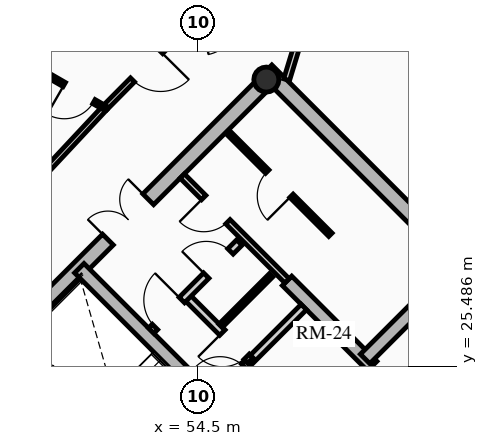
"""IFC4 building model, lengths in metres.
Left out: names, types, materials, properties, quantities, classifications, styles, units other than length and angle.
Written with IfcOpenShell. Run it as: python <this file> out.ifc"""

import sys

from ifc_helpers import new_model, si_unit, direction, frame, frame_2d, origin, origin_2d, place, context, subcontext, project, spatial, rectangle, hollow_circle, extrude, source, transform, mapped, element, fill, save


model = new_model("IFC4")
c1 = context("Model", 3, precision=1e-05, world=origin(), true_north=direction((0.0, 1.0)))
c2 = subcontext(c1, "Body", "Model", "MODEL_VIEW")
j1 = project(units=[si_unit("LENGTHUNIT", "METRE"), si_unit("PLANEANGLEUNIT", "RADIAN")], contexts=[c1])
p1 = place(None, origin())
s1 = spatial("IfcSite", under=j1, at=p1, CompositionType="ELEMENT")
p2 = place(p1, origin())
s2 = spatial("IfcBuilding", under=s1, at=p2, CompositionType="ELEMENT")
p3 = place(p2, frame((0.0, 0.0, 211.21)))
s3 = spatial("IfcBuildingStorey", under=s2, at=p3, CompositionType="ELEMENT", Elevation=211.21)
for number, where, z_axis, x_axis in (
    (1, (58.702, 15.732, 0.0), (0.0, 0.0, 1.0), (-0.707, 0.707, 0.0)),
    (2, (66.268, 23.298, 0.0), (0.0, 0.0, 1.0), (-0.707, 0.707, 0.0)),
):
    element("IfcWall", number, at=place(p3, frame(where, z_axis=z_axis, x_axis=x_axis)), inside=s3, PredefinedType="SHEAR", context=c2, shape_type="SweptSolid", body=[
        extrude(rectangle(XDim=14.1, YDim=0.4, at=frame_2d((7.05, 0.0))), origin(), (0.0, 0.0, 1.0), 2.91),
    ])
p4 = place(p3, frame((48.873, 25.561, 0.0), z_axis=(0.0, 0.0, 1.0), x_axis=(0.707106781187, 0.707106781187, 0.0)))
e3 = element("IfcWall", 3, at=p4, inside=s3, PredefinedType="SHEAR", context=c2, shape_type="SweptSolid", body=[
    extrude(rectangle(XDim=10.7, YDim=0.4, at=frame_2d((5.35, 0.0))), origin(), (0.0, 0.0, 1.0), 2.91),
])
m1 = source(origin(), c2, "Body", "SweptSolid", [
    extrude(rectangle(XDim=1.5, YDim=2.02, at=frame_2d((0.75, 1.01))), frame((0.0, 0.21, 0.0), z_axis=(0.0, -1.0, 0.0), x_axis=(1.0, 0.0, 0.0)), (0.0, 0.0, 1.0), 0.42),
])
p5 = place(p4, frame((4.6, 0.0, 0.0)))
e4 = element("IfcOpeningElement", 4, at=p5, cuts=e3, PredefinedType="OPENING", context=c2, shape_type="MappedRepresentation", body=[
    mapped(m1, transform((0.0, 0.0, 0.0), x_axis=(1.0, 0.0, 0.0), y_axis=(0.0, 1.0, 0.0), z_axis=(0.0, 0.0, 1.0), scale=1.0)),
])
p6 = place(p3, frame((61.06, 18.373, 0.0), z_axis=(0.0, 0.0, 1.0), x_axis=(-0.707106781187, 0.707106781187, 0.0)))
e5 = element("IfcWall", 5, at=p6, inside=s3, PredefinedType="SHEAR", context=c2, shape_type="SweptSolid", body=[
    extrude(rectangle(XDim=13.7, YDim=0.35, at=frame_2d((6.85, 0.0))), origin(), (0.0, 0.0, 1.0), 2.91),
])
m2 = source(origin(), c2, "Body", "SweptSolid", [
    extrude(rectangle(XDim=1.1, YDim=2.015, at=frame_2d((0.55, 1.007))), frame((0.0, 0.185, 0.0), z_axis=(0.0, -1.0, 0.0), x_axis=(1.0, 0.0, 0.0)), (0.0, 0.0, 1.0), 0.37),
])
p7 = place(p6, frame((4.85, 0.0, 0.0)))
e6 = element("IfcOpeningElement", 6, at=p7, cuts=e5, PredefinedType="OPENING", context=c2, shape_type="MappedRepresentation", body=[
    mapped(m2, transform((0.0, 0.0, 0.0), x_axis=(1.0, 0.0, 0.0), y_axis=(0.0, 1.0, 0.0), z_axis=(0.0, 0.0, 1.0), scale=1.0)),
])
p8 = place(p6, frame((0.625, 0.0, 0.0)))
e7 = element("IfcOpeningElement", 7, at=p8, cuts=e5, PredefinedType="OPENING", context=c2, shape_type="MappedRepresentation", body=[
    mapped(m2, transform((0.0, 0.0, 0.0), x_axis=(1.0, 0.0, 0.0), y_axis=(0.0, 1.0, 0.0), z_axis=(0.0, 0.0, 1.0), scale=1.0)),
])
p9 = place(p6, frame((2.625, 0.0, 0.0)))
e8 = element("IfcOpeningElement", 8, at=p9, cuts=e5, PredefinedType="OPENING", context=c2, shape_type="MappedRepresentation", body=[
    mapped(m2, transform((0.0, 0.0, 0.0), x_axis=(1.0, 0.0, 0.0), y_axis=(0.0, 1.0, 0.0), z_axis=(0.0, 0.0, 1.0), scale=1.0)),
])
m3 = source(origin(), c2, "Body", "SweptSolid", [
    extrude(rectangle(XDim=1.15, YDim=2.02, at=frame_2d((0.575, 1.01))), frame((0.0, 0.185, 0.0), z_axis=(0.0, -1.0, 0.0), x_axis=(1.0, 0.0, 0.0)), (0.0, 0.0, 1.0), 0.37),
])
p10 = place(p6, frame((7.27, 0.0, 0.0)))
e9 = element("IfcOpeningElement", 9, at=p10, cuts=e5, PredefinedType="OPENING", context=c2, shape_type="MappedRepresentation", body=[
    mapped(m3, transform((0.0, 0.0, 0.0), x_axis=(1.0, 0.0, 0.0), y_axis=(0.0, 1.0, 0.0), z_axis=(0.0, 0.0, 1.0), scale=1.0)),
])
p11 = place(p3, frame((63.627, 20.94, 0.0), z_axis=(0.0, 0.0, 1.0), x_axis=(-0.707119496762, 0.707094065383, 0.0)))
e10 = element("IfcWall", 10, at=p11, inside=s3, PredefinedType="SHEAR", context=c2, shape_type="SweptSolid", body=[
    extrude(rectangle(XDim=9.6, YDim=0.35, at=frame_2d((4.8, 0.0))), origin(), (0.0, 0.0, 1.0), 2.91),
])
p12 = place(p11, frame((5.28, 0.0, 0.0)))
e11 = element("IfcOpeningElement", 11, at=p12, cuts=e10, PredefinedType="OPENING", context=c2, shape_type="MappedRepresentation", body=[
    mapped(m3, transform((0.0, 0.0, 0.0), x_axis=(1.0, 0.0, 0.0), y_axis=(0.0, 1.0, 0.0), z_axis=(0.0, 0.0, 1.0), scale=1.0)),
])
p13 = place(p3, frame((53.922, 21.141, 0.0), z_axis=(0.0, 0.0, 1.0), x_axis=(-0.707106781187, 0.707106781187, 0.0)))
e12 = element("IfcWall", 12, at=p13, inside=s3, PredefinedType="SHEAR", context=c2, shape_type="SweptSolid", body=[
    extrude(rectangle(XDim=6.695, YDim=0.35, at=frame_2d((3.348, 0.0))), origin(), (0.0, 0.0, 1.0), 2.91),
])
p14 = place(p3, frame((58.893, 25.674, 0.0), z_axis=(0.0, 0.0, 1.0), x_axis=(0.707106781187, 0.707106781187, 0.0)))
e13 = element("IfcWall", 13, at=p14, inside=s3, PredefinedType="SHEAR", context=c2, shape_type="SweptSolid", body=[
    extrude(rectangle(XDim=3.285, YDim=0.35, at=frame_2d((1.643, 0.0))), origin(), (0.0, 0.0, 1.0), 2.91),
])
p15 = place(p3, frame((56.294, 33.024, 0.0), z_axis=(0.0, 0.0, 1.0), x_axis=(0.707106781187, 0.707106781187, 0.0)))
e14 = element("IfcColumn", 14, at=p15, inside=s3, PredefinedType="COLUMN", context=c2, shape_type="SweptSolid", body=[
    extrude(hollow_circle(Radius=0.33, WallThickness=0.025, at=origin_2d()), origin(), (0.0, 0.0, 1.0), 2.91),
])
p16 = place(p3, frame((54.961, 24.719, 0.0), z_axis=(0.0, 0.0, 1.0), x_axis=(0.707106781187, 0.707106781187, 0.0)))
e15 = element("IfcWall", 15, at=p16, inside=s3, PredefinedType="PARTITIONING", context=c2, shape_type="SweptSolid", body=[
    extrude(rectangle(XDim=3.28, YDim=0.2, at=frame_2d((1.64, 0.0))), origin(), (0.0, 0.0, 1.0), 2.685),
])
m4 = source(origin(), c2, "Body", "SweptSolid", [
    extrude(rectangle(XDim=0.9, YDim=2.005, at=frame_2d((0.45, 1.002))), frame((0.0, 0.11, 0.0), z_axis=(0.0, -1.0, 0.0), x_axis=(1.0, 0.0, 0.0)), (0.0, 0.0, 1.0), 0.22),
])
p17 = place(p16, frame((0.16, 0.0, 0.0)))
e16 = element("IfcOpeningElement", 16, at=p17, cuts=e15, PredefinedType="OPENING", context=c2, shape_type="MappedRepresentation", body=[
    mapped(m4, transform((0.0, 0.0, 0.0), x_axis=(1.0, 0.0, 0.0), y_axis=(0.0, 1.0, 0.0), z_axis=(0.0, 0.0, 1.0), scale=1.0)),
])
p18 = place(p3, frame((55.874, 25.631, 0.0), z_axis=(0.0, 0.0, 1.0), x_axis=(-0.707157639372, 0.707055919343, 0.0)))
e17 = element("IfcWall", 17, at=p18, inside=s3, PredefinedType="PARTITIONING", context=c2, shape_type="SweptSolid", body=[
    extrude(rectangle(XDim=2.4, YDim=0.2, at=frame_2d((1.2, 0.0))), origin(), (0.0, 0.0, 1.0), 2.685),
])
p19 = place(p18, frame((0.14, 0.0, 0.0)))
e18 = element("IfcOpeningElement", 18, at=p19, cuts=e17, PredefinedType="OPENING", context=c2, shape_type="MappedRepresentation", body=[
    mapped(m4, transform((0.0, 0.0, 0.0), x_axis=(1.0, 0.0, 0.0), y_axis=(0.0, 1.0, 0.0), z_axis=(0.0, 0.0, 1.0), scale=1.0)),
])
p20 = place(p3, frame((53.264, 26.416, 0.0), z_axis=(0.0, 0.0, 1.0), x_axis=(0.707106781187, 0.707106781187, 0.0)))
e19 = element("IfcWall", 19, at=p20, inside=s3, PredefinedType="PARTITIONING", context=c2, shape_type="SweptSolid", body=[
    extrude(rectangle(XDim=3.28, YDim=0.2, at=frame_2d((1.64, 0.0))), origin(), (0.0, 0.0, 1.0), 2.685),
])
m5 = source(origin(), c2, "Body", "SweptSolid", [
    extrude(rectangle(XDim=1.0, YDim=2.015, at=frame_2d((0.5, 1.007))), frame((0.0, 0.11, 0.0), z_axis=(0.0, -1.0, 0.0), x_axis=(1.0, 0.0, 0.0)), (0.0, 0.0, 1.0), 0.22),
])
p21 = place(p20, frame((0.14, 0.0, 0.0)))
e20 = element("IfcOpeningElement", 20, at=p21, cuts=e19, PredefinedType="OPENING", context=c2, shape_type="MappedRepresentation", body=[
    mapped(m5, transform((0.0, 0.0, 0.0), x_axis=(1.0, 0.0, 0.0), y_axis=(0.0, 1.0, 0.0), z_axis=(0.0, 0.0, 1.0), scale=1.0)),
])
p22 = place(p20, frame((2.05, 0.0, 0.0)))
e21 = element("IfcOpeningElement", 21, at=p22, cuts=e19, PredefinedType="OPENING", context=c2, shape_type="MappedRepresentation", body=[
    mapped(m4, transform((0.0, 0.0, 0.0), x_axis=(1.0, 0.0, 0.0), y_axis=(0.0, 1.0, 0.0), z_axis=(0.0, 0.0, 1.0), scale=1.0)),
])
p23 = place(p3, frame((55.089, 26.543, 0.0), z_axis=(0.0, 0.0, 1.0), x_axis=(0.707106781187, 0.707106781187, 0.0)))
e22 = element("IfcWall", 22, at=p23, inside=s3, PredefinedType="PARTITIONING", context=c2, shape_type="SweptSolid", body=[
    extrude(rectangle(XDim=1.88, YDim=0.125, at=frame_2d((0.94, 0.0))), origin(), (0.0, 0.0, 1.0), 2.685),
])
p24 = place(p3, frame((56.839, 27.728, 0.0), z_axis=(0.0, 0.0, 1.0), x_axis=(-0.707106781187, 0.707106781187, 0.0)))
e23 = element("IfcWall", 23, at=p24, inside=s3, PredefinedType="PARTITIONING", context=c2, shape_type="SweptSolid", body=[
    extrude(rectangle(XDim=3.9, YDim=0.16, at=frame_2d((1.95, 0.0))), origin(), (0.0, 0.0, 1.0), 2.685),
])
m6 = source(origin(), c2, "Body", "SweptSolid", [
    extrude(rectangle(XDim=0.9, YDim=2.005, at=frame_2d((0.45, 1.002))), frame((0.0, 0.09, 0.0), z_axis=(0.0, -1.0, 0.0), x_axis=(1.0, 0.0, 0.0)), (0.0, 0.0, 1.0), 0.18),
])
p25 = place(p24, frame((2.2, 0.0, 0.0)))
e24 = element("IfcOpeningElement", 24, at=p25, cuts=e23, PredefinedType="OPENING", context=c2, shape_type="MappedRepresentation", body=[
    mapped(m6, transform((0.0, 0.0, 0.0), x_axis=(1.0, 0.0, 0.0), y_axis=(0.0, 1.0, 0.0), z_axis=(0.0, 0.0, 1.0), scale=1.0)),
])
p26 = place(p3, frame((57.981, 28.941, 0.0), z_axis=(0.0, 0.0, 1.0), x_axis=(-0.707074823725, 0.707138737204, 0.0)))
e25 = element("IfcWall", 25, at=p26, inside=s3, PredefinedType="PARTITIONING", context=c2, shape_type="SweptSolid", body=[
    extrude(rectangle(XDim=3.82, YDim=0.125, at=frame_2d((1.91, 0.0))), origin(), (0.0, 0.0, 1.0), 2.685),
])
m7 = source(origin(), c2, "Body", "SweptSolid", [
    extrude(rectangle(XDim=0.9, YDim=2.005, at=frame_2d((0.45, 1.002))), frame((0.0, 0.073, 0.0), z_axis=(0.0, -1.0, 0.0), x_axis=(1.0, 0.0, 0.0)), (0.0, 0.0, 1.0), 0.145),
])
p27 = place(p26, frame((1.45, 0.0, 0.0)))
e26 = element("IfcOpeningElement", 26, at=p27, cuts=e25, PredefinedType="OPENING", context=c2, shape_type="MappedRepresentation", body=[
    mapped(m7, transform((0.0, 0.0, 0.0), x_axis=(1.0, 0.0, 0.0), y_axis=(0.0, 1.0, 0.0), z_axis=(0.0, 0.0, 1.0), scale=1.0)),
])
p28 = place(p3, frame((54.427, 34.683, 0.0), z_axis=(0.0, 0.0, 1.0), x_axis=(-0.704178989986, -0.710022499687, 0.0)))
e27 = element("IfcWall", 27, at=p28, inside=s3, PredefinedType="PARTITIONING", context=c2, shape_type="SweptSolid", body=[
    extrude(rectangle(XDim=3.384, YDim=0.15, at=frame_2d((1.692, 0.0))), origin(), (0.0, 0.0, 1.0), 2.322),
])
m8 = source(origin(), c2, "Body", "SweptSolid", [
    extrude(rectangle(XDim=1.05, YDim=2.015, at=frame_2d((0.525, 1.007))), frame((0.0, 0.085, 0.0), z_axis=(0.0, -1.0, 0.0), x_axis=(1.0, 0.0, 0.0)), (0.0, 0.0, 1.0), 0.17),
])
p29 = place(p28, frame((1.298, 0.0, 0.0)))
e28 = element("IfcOpeningElement", 28, at=p29, cuts=e27, PredefinedType="OPENING", context=c2, shape_type="MappedRepresentation", body=[
    mapped(m8, transform((0.0, 0.0, 0.0), x_axis=(1.0, 0.0, 0.0), y_axis=(0.0, 1.0, 0.0), z_axis=(0.0, 0.0, 1.0), scale=1.0)),
])
p30 = place(p3, frame((52.043, 32.28, 0.0), z_axis=(0.0, 0.0, 1.0), x_axis=(-0.682606081633, -0.730786519661, 0.0)))
e29 = element("IfcWall", 29, at=p30, inside=s3, PredefinedType="PARTITIONING", context=c2, shape_type="SweptSolid", body=[
    extrude(rectangle(XDim=6.527, YDim=0.15, at=frame_2d((3.263, 0.0))), origin(), (0.0, 0.0, 1.0), 2.255),
])
p31 = place(p3, frame((56.828, 33.021, 0.0), z_axis=(0.0, 0.0, 1.0), x_axis=(0.292139093972, 0.956375841274, 0.0)))
e30 = element("IfcWall", 30, at=p31, inside=s3, PredefinedType="PARTITIONING", context=c2, shape_type="SweptSolid", body=[
    extrude(rectangle(XDim=2.186, YDim=0.16, at=frame_2d((1.093, 0.0))), origin(), (0.0, 0.0, 1.0), 2.255),
])
m9 = source(origin(), c2, "Body", "SweptSolid", [
    extrude(rectangle(XDim=1.05, YDim=2.015, at=frame_2d((0.525, 1.007))), frame((0.0, 0.09, 0.0), z_axis=(0.0, -1.0, 0.0), x_axis=(1.0, 0.0, 0.0)), (0.0, 0.0, 1.0), 0.18),
])
p32 = place(p31, frame((0.936, 0.0, 0.0)))
e31 = element("IfcOpeningElement", 31, at=p32, cuts=e30, PredefinedType="OPENING", context=c2, shape_type="MappedRepresentation", body=[
    mapped(m9, transform((0.0, 0.0, 0.0), x_axis=(1.0, 0.0, 0.0), y_axis=(0.0, 1.0, 0.0), z_axis=(0.0, 0.0, 1.0), scale=1.0)),
])
p33 = place(p3, frame((52.043, 32.28, 0.0), z_axis=(0.0, 0.0, 1.0), x_axis=(-0.866853616581, 0.498562741709, 0.0)))
e32 = element("IfcWall", 32, at=p33, inside=s3, PredefinedType="PARTITIONING", context=c2, shape_type="SweptSolid", body=[
    extrude(rectangle(XDim=6.308, YDim=0.125, at=frame_2d((3.154, 0.0))), origin(), (0.0, 0.0, 1.0), 2.322),
])
p34 = place(p33, frame((0.33, 0.0, 0.0)))
e33 = element("IfcOpeningElement", 33, at=p34, cuts=e32, PredefinedType="OPENING", context=c2, shape_type="MappedRepresentation", body=[
    mapped(m7, transform((0.0, 0.0, 0.0), x_axis=(1.0, 0.0, 0.0), y_axis=(0.0, 1.0, 0.0), z_axis=(0.0, 0.0, 1.0), scale=1.0)),
])
m10 = source(origin(), c2, "Body", "SweptSolid", [
    extrude(rectangle(XDim=1.15, YDim=2.02, at=frame_2d((0.575, 1.01))), frame((0.0, 0.025, 0.0), z_axis=(0.0, -1.0, 0.0), x_axis=(1.0, 0.0, 0.0)), (0.0, 0.0, 1.0), 0.05),
])
p35 = place(p12, origin())
e34 = element("IfcDoor", 34, at=p35, inside=s3, OperationType="SINGLE_SWING_RIGHT", PredefinedType="DOOR", context=c2, shape_type="MappedRepresentation", body=[
    mapped(m10, transform((0.0, 0.0, 0.0), x_axis=(1.0, 0.0, 0.0), y_axis=(0.0, 1.0, 0.0), z_axis=(0.0, 0.0, 1.0), scale=1.0)),
])
fill(e11, e34)
m11 = source(origin(), c2, "Body", "SweptSolid", [
    extrude(rectangle(XDim=1.5, YDim=2.02, at=frame_2d((0.75, 1.01))), frame((0.0, 0.025, 0.0), z_axis=(0.0, -1.0, 0.0), x_axis=(1.0, 0.0, 0.0)), (0.0, 0.0, 1.0), 0.05),
])
p36 = place(p5, origin())
e35 = element("IfcDoor", 35, at=p36, inside=s3, OperationType="DOUBLE_DOOR_SINGLE_SWING", PredefinedType="DOOR", context=c2, shape_type="MappedRepresentation", body=[
    mapped(m11, transform((0.0, 0.0, 0.0), x_axis=(1.0, 0.0, 0.0), y_axis=(0.0, 1.0, 0.0), z_axis=(0.0, 0.0, 1.0), scale=1.0)),
])
fill(e4, e35)
m12 = source(origin(), c2, "Body", "SweptSolid", [
    extrude(rectangle(XDim=0.9, YDim=2.005, at=frame_2d((0.45, 1.002))), frame((0.0, 0.025, 0.0), z_axis=(0.0, -1.0, 0.0), x_axis=(1.0, 0.0, 0.0)), (0.0, 0.0, 1.0), 0.05),
])
p37 = place(p17, origin())
e36 = element("IfcDoor", 36, at=p37, inside=s3, OperationType="SINGLE_SWING_LEFT", PredefinedType="DOOR", context=c2, shape_type="MappedRepresentation", body=[
    mapped(m12, transform((0.0, 0.0, 0.0), x_axis=(1.0, 0.0, 0.0), y_axis=(0.0, 1.0, 0.0), z_axis=(0.0, 0.0, 1.0), scale=1.0)),
])
fill(e16, e36)
m13 = source(origin(), c2, "Body", "SweptSolid", [
    extrude(rectangle(XDim=1.0, YDim=2.015, at=frame_2d((0.5, 1.007))), frame((0.0, 0.025, 0.0), z_axis=(0.0, -1.0, 0.0), x_axis=(1.0, 0.0, 0.0)), (0.0, 0.0, 1.0), 0.05),
])
p38 = place(p21, origin())
e37 = element("IfcDoor", 37, at=p38, inside=s3, OperationType="SINGLE_SWING_RIGHT", PredefinedType="DOOR", context=c2, shape_type="MappedRepresentation", body=[
    mapped(m13, transform((0.0, 0.0, 0.0), x_axis=(1.0, 0.0, 0.0), y_axis=(0.0, 1.0, 0.0), z_axis=(0.0, 0.0, 1.0), scale=1.0)),
])
fill(e20, e37)
p39 = place(p19, origin())
e38 = element("IfcDoor", 38, at=p39, inside=s3, OperationType="SINGLE_SWING_RIGHT", PredefinedType="DOOR", context=c2, shape_type="MappedRepresentation", body=[
    mapped(m12, transform((0.0, 0.0, 0.0), x_axis=(1.0, 0.0, 0.0), y_axis=(0.0, 1.0, 0.0), z_axis=(0.0, 0.0, 1.0), scale=1.0)),
])
fill(e18, e38)
p40 = place(p22, origin())
e39 = element("IfcDoor", 39, at=p40, inside=s3, OperationType="SINGLE_SWING_LEFT", PredefinedType="DOOR", context=c2, shape_type="MappedRepresentation", body=[
    mapped(m12, transform((0.0, 0.0, 0.0), x_axis=(1.0, 0.0, 0.0), y_axis=(0.0, 1.0, 0.0), z_axis=(0.0, 0.0, 1.0), scale=1.0)),
])
fill(e21, e39)
p41 = place(p25, origin())
e40 = element("IfcDoor", 40, at=p41, inside=s3, OperationType="SINGLE_SWING_RIGHT", PredefinedType="DOOR", context=c2, shape_type="MappedRepresentation", body=[
    mapped(m12, transform((0.0, 0.0, 0.0), x_axis=(1.0, 0.0, 0.0), y_axis=(0.0, 1.0, 0.0), z_axis=(0.0, 0.0, 1.0), scale=1.0)),
])
fill(e24, e40)
p42 = place(p27, origin())
e41 = element("IfcDoor", 41, at=p42, inside=s3, OperationType="SINGLE_SWING_LEFT", PredefinedType="DOOR", context=c2, shape_type="MappedRepresentation", body=[
    mapped(m12, transform((0.0, 0.0, 0.0), x_axis=(1.0, 0.0, 0.0), y_axis=(0.0, 1.0, 0.0), z_axis=(0.0, 0.0, 1.0), scale=1.0)),
])
fill(e26, e41)
m14 = source(origin(), c2, "Body", "SweptSolid", [
    extrude(rectangle(XDim=1.05, YDim=2.015, at=frame_2d((0.525, 1.007))), frame((0.0, 0.025, 0.0), z_axis=(0.0, -1.0, 0.0), x_axis=(1.0, 0.0, 0.0)), (0.0, 0.0, 1.0), 0.05),
])
p43 = place(p29, origin())
e42 = element("IfcDoor", 42, at=p43, inside=s3, OperationType="SINGLE_SWING_LEFT", PredefinedType="DOOR", context=c2, shape_type="MappedRepresentation", body=[
    mapped(m14, transform((0.0, 0.0, 0.0), x_axis=(1.0, 0.0, 0.0), y_axis=(0.0, 1.0, 0.0), z_axis=(0.0, 0.0, 1.0), scale=1.0)),
])
fill(e28, e42)
p44 = place(p34, origin())
e43 = element("IfcDoor", 43, at=p44, inside=s3, OperationType="SINGLE_SWING_RIGHT", PredefinedType="DOOR", context=c2, shape_type="MappedRepresentation", body=[
    mapped(m12, transform((0.0, 0.0, 0.0), x_axis=(1.0, 0.0, 0.0), y_axis=(0.0, 1.0, 0.0), z_axis=(0.0, 0.0, 1.0), scale=1.0)),
])
fill(e33, e43)
save(model, sys.argv[1])
